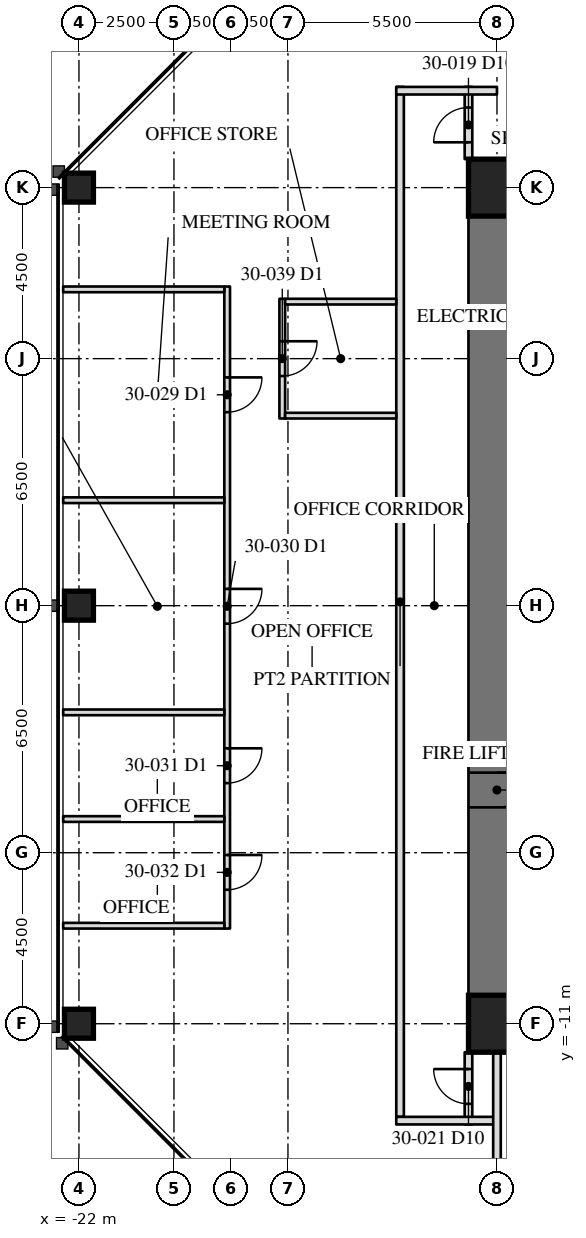
"""IFC4 building model, lengths in metres.
Left out: names, types, materials, properties, quantities, classifications, styles, units other than length and angle.
Written with IfcOpenShell. Run it as: python <this file> out.ifc"""

import sys

from ifc_helpers import new_model, si_unit, direction, frame, frame_2d, origin, origin_2d, place, context, subcontext, project, spatial, rectangle, hollow_rectangle, extrude, element, fill, save


model = new_model("IFC4")
c1 = context("Model", 3, precision=1e-05, world=origin(), true_north=direction((0.0, 1.0)))
c2 = subcontext(c1, "Body", "Model", "MODEL_VIEW")
j1 = project(units=[si_unit("LENGTHUNIT", "METRE"), si_unit("PLANEANGLEUNIT", "RADIAN")], contexts=[c1])
p1 = place(None, origin())
s1 = spatial("IfcSite", under=j1, at=p1, CompositionType="ELEMENT")
p2 = place(p1, origin())
s2 = spatial("IfcBuilding", under=s1, at=p2, CompositionType="ELEMENT")
p3 = place(p2, frame((0.0, 0.0, 129.5)))
s3 = spatial("IfcBuildingStorey", under=s2, at=p3, CompositionType="ELEMENT", Elevation=129.5)
for number, where, z_axis, x_axis in (
    (1, (-22.0, 0.0, 0.0), (0.0, 0.0, 1.0), (0.0, 1.0, 0.0)),
    (2, (-22.0, -11.0, 0.0), (0.0, 0.0, 1.0), (0.0, 1.0, 0.0)),
    (3, (-22.0, 11.0, 0.0), (0.0, 0.0, 1.0), (0.0, 1.0, 0.0)),
):
    element("IfcColumn", number, at=place(p3, frame(where, z_axis=z_axis, x_axis=x_axis)), inside=s3, PredefinedType="COLUMN", context=c2, shape_type="SweptSolid", body=[
        extrude(hollow_rectangle(XDim=0.762, YDim=0.762, WallThickness=0.076, at=origin_2d()), origin(), (0.0, 0.0, 1.0), 4.1),
    ])
p4 = place(p3, frame((-11.0, 11.0, 0.0), z_axis=(0.0, 0.0, 1.0), x_axis=(0.0, -1.0, 0.0)))
e4 = element("IfcWall", 4, at=p4, inside=s3, PredefinedType="SHEAR", context=c2, shape_type="SweptSolid", body=[
    extrude(rectangle(XDim=22.0, YDim=1.5, at=frame_2d((11.0, 0.0))), origin(), (0.0, 0.0, 1.0), 4.1),
])
p5 = place(p4, frame((15.393, 0.0, 0.0)))
e5 = element("IfcOpeningElement", 5, at=p5, cuts=e4, PredefinedType="OPENING", context=c2, shape_type="SweptSolid", body=[
    extrude(rectangle(XDim=0.915, YDim=2.134, at=frame_2d((0.458, 1.067))), frame((0.0, 0.76, 0.0), z_axis=(0.0, -1.0, 0.0), x_axis=(1.0, 0.0, 0.0)), (0.0, 0.0, 1.0), 1.52),
])
for number, where, z_axis, x_axis in (
    (6, (-6.5, 11.0, 0.0), (0.0, 0.0, 1.0), (-1.0, 0.0, 0.0)),
    (7, (-11.0, -11.0, 0.0), (0.0, 0.0, 1.0), (1.0, 0.0, 0.0)),
):
    element("IfcWall", number, at=place(p3, frame(where, z_axis=z_axis, x_axis=x_axis)), inside=s3, PredefinedType="SHEAR", context=c2, shape_type="SweptSolid", body=[
        extrude(rectangle(XDim=4.5, YDim=1.5, at=frame_2d((2.25, 0.0))), origin(), (0.0, 0.0, 1.0), 4.1),
    ])
for number, where, z_axis, x_axis in (
    (8, (-11.0, 11.0, 0.0), (0.0, 0.0, 1.0), (1.0, 0.0, 0.0)),
    (9, (-11.0, -11.0, 0.0), (0.0, 0.0, 1.0), (1.0, 0.0, 0.0)),
):
    element("IfcColumn", number, at=place(p3, frame(where, z_axis=z_axis, x_axis=x_axis)), inside=s3, PredefinedType="COLUMN", context=c2, shape_type="SweptSolid", body=[
        extrude(hollow_rectangle(XDim=1.499, YDim=1.499, WallThickness=0.102, at=origin_2d()), origin(), (0.0, 0.0, 1.0), 4.1),
    ])
p6 = place(p3, frame((-13.55, 13.65, 0.0), z_axis=(0.0, 0.0, 1.0), x_axis=(0.0, -1.0, 0.0)))
e10 = element("IfcWall", 10, at=p6, inside=s3, PredefinedType="PARTITIONING", context=c2, shape_type="SweptSolid", body=[
    extrude(rectangle(XDim=27.1, YDim=0.2, at=frame_2d((13.55, 0.0))), origin(), (0.0, 0.0, 1.0), 3.91),
])
p7 = place(p3, frame((-11.75, 11.75, 0.0), z_axis=(0.0, 0.0, 1.0), x_axis=(0.0, 1.0, 0.0)))
e11 = element("IfcWall", 11, at=p7, inside=s3, PredefinedType="PARTITIONING", context=c2, shape_type="SweptSolid", body=[
    extrude(rectangle(XDim=1.9, YDim=0.2, at=frame_2d((0.95, 0.0))), origin(), (0.0, 0.0, 1.0), 3.91),
])
p8 = place(p7, frame((0.442, 0.0, 0.0)))
e12 = element("IfcOpeningElement", 12, at=p8, cuts=e11, PredefinedType="OPENING", context=c2, shape_type="SweptSolid", body=[
    extrude(rectangle(XDim=0.915, YDim=2.134, at=frame_2d((0.458, 1.067))), frame((0.0, 0.11, 0.0), z_axis=(0.0, -1.0, 0.0), x_axis=(1.0, 0.0, 0.0)), (0.0, 0.0, 1.0), 0.22),
])
p9 = place(p3, frame((-11.0, 13.55, 0.0), z_axis=(0.0, 0.0, 1.0), x_axis=(-1.0, 0.0, 0.0)))
e13 = element("IfcWall", 13, at=p9, inside=s3, PredefinedType="PARTITIONING", context=c2, shape_type="SweptSolid", body=[
    extrude(rectangle(XDim=2.65, YDim=0.2, at=frame_2d((1.325, 0.0))), origin(), (0.0, 0.0, 1.0), 3.91),
])
p10 = place(p3, frame((-11.75, -11.75, 0.0), z_axis=(0.0, 0.0, 1.0), x_axis=(0.0, -1.0, 0.0)))
e14 = element("IfcWall", 14, at=p10, inside=s3, PredefinedType="PARTITIONING", context=c2, shape_type="SweptSolid", body=[
    extrude(rectangle(XDim=1.9, YDim=0.2, at=frame_2d((0.95, 0.0))), origin(), (0.0, 0.0, 1.0), 3.91),
])
p11 = place(p10, frame((0.442, 0.0, 0.0)))
e15 = element("IfcOpeningElement", 15, at=p11, cuts=e14, PredefinedType="OPENING", context=c2, shape_type="SweptSolid", body=[
    extrude(rectangle(XDim=0.915, YDim=2.134, at=frame_2d((0.458, 1.067))), frame((0.0, 0.11, 0.0), z_axis=(0.0, -1.0, 0.0), x_axis=(1.0, 0.0, 0.0)), (0.0, 0.0, 1.0), 0.22),
])
p12 = place(p3, frame((-11.0, -13.55, 0.0), z_axis=(0.0, 0.0, 1.0), x_axis=(-1.0, 0.0, 0.0)))
e16 = element("IfcWall", 16, at=p12, inside=s3, PredefinedType="PARTITIONING", context=c2, shape_type="SweptSolid", body=[
    extrude(rectangle(XDim=2.65, YDim=0.2, at=frame_2d((1.325, 0.0))), origin(), (0.0, 0.0, 1.0), 3.91),
])
p13 = place(p3, frame((-11.0, -11.75, 0.0), z_axis=(0.0, 0.0, 1.0), x_axis=(0.0, -1.0, 0.0)))
e17 = element("IfcWall", 17, at=p13, inside=s3, PredefinedType="PARTITIONING", context=c2, shape_type="SweptSolid", body=[
    extrude(rectangle(XDim=10.665, YDim=0.2, at=frame_2d((5.333, 0.0))), origin(), (0.0, 0.0, 1.0), 3.326),
])
p14 = place(p3, frame((-18.1, 8.398, 0.0), z_axis=(0.0, 0.0, 1.0), x_axis=(0.0, -1.0, 0.0)))
e18 = element("IfcWall", 18, at=p14, inside=s3, PredefinedType="PARTITIONING", context=c2, shape_type="SweptSolid", body=[
    extrude(rectangle(XDim=16.894, YDim=0.15, at=frame_2d((8.447, 0.0))), origin(), (0.0, 0.0, 1.0), 3.91),
])
p15 = place(p14, frame((2.392, 0.0, 0.0)))
e19 = element("IfcOpeningElement", 19, at=p15, cuts=e18, PredefinedType="OPENING", context=c2, shape_type="SweptSolid", body=[
    extrude(rectangle(XDim=0.915, YDim=2.134, at=frame_2d((0.458, 1.067))), frame((0.0, 0.085, 0.0), z_axis=(0.0, -1.0, 0.0), x_axis=(1.0, 0.0, 0.0)), (0.0, 0.0, 1.0), 0.17),
])
p16 = place(p14, frame((7.957, 0.0, 0.0)))
e20 = element("IfcOpeningElement", 20, at=p16, cuts=e18, PredefinedType="OPENING", context=c2, shape_type="SweptSolid", body=[
    extrude(rectangle(XDim=0.915, YDim=2.134, at=frame_2d((0.458, 1.067))), frame((0.0, 0.085, 0.0), z_axis=(0.0, -1.0, 0.0), x_axis=(1.0, 0.0, 0.0)), (0.0, 0.0, 1.0), 0.17),
])
p17 = place(p14, frame((12.151, 0.0, 0.0)))
e21 = element("IfcOpeningElement", 21, at=p17, cuts=e18, PredefinedType="OPENING", context=c2, shape_type="SweptSolid", body=[
    extrude(rectangle(XDim=0.915, YDim=2.134, at=frame_2d((0.458, 1.067))), frame((0.0, 0.085, 0.0), z_axis=(0.0, -1.0, 0.0), x_axis=(1.0, 0.0, 0.0)), (0.0, 0.0, 1.0), 0.17),
])
p18 = place(p14, frame((14.958, 0.0, 0.0)))
e22 = element("IfcOpeningElement", 22, at=p18, cuts=e18, PredefinedType="OPENING", context=c2, shape_type="SweptSolid", body=[
    extrude(rectangle(XDim=0.915, YDim=2.134, at=frame_2d((0.458, 1.067))), frame((0.0, 0.085, 0.0), z_axis=(0.0, -1.0, 0.0), x_axis=(1.0, 0.0, 0.0)), (0.0, 0.0, 1.0), 0.17),
])
for number, where, z_axis, x_axis in (
    (23, (-18.175, 8.323, 0.0), (0.0, 0.0, 1.0), (-1.0, 0.0, 0.0)),
    (24, (-18.175, 2.775, 0.0), (0.0, 0.0, 1.0), (-1.0, 0.0, 0.0)),
    (25, (-18.175, -2.807, 0.0), (0.0, 0.0, 1.0), (-1.0, 0.0, 0.0)),
    (26, (-18.175, -5.614, 0.0), (0.0, 0.0, 1.0), (-1.0, 0.0, 0.0)),
    (27, (-18.175, -8.421, 0.0), (0.0, 0.0, 1.0), (-1.0, 0.0, 0.0)),
):
    element("IfcWall", number, at=place(p3, frame(where, z_axis=z_axis, x_axis=x_axis)), inside=s3, PredefinedType="PARTITIONING", context=c2, shape_type="SweptSolid", body=[
        extrude(rectangle(XDim=4.24, YDim=0.15, at=frame_2d((2.12, 0.0))), origin(), (0.0, 0.0, 1.0), 3.91),
    ])
p19 = place(p3, frame((-16.65, 8.075, 0.0), z_axis=(0.0, 0.0, 1.0), x_axis=(0.0, -1.0, 0.0)))
e28 = element("IfcWall", 28, at=p19, inside=s3, PredefinedType="PARTITIONING", context=c2, shape_type="SweptSolid", body=[
    extrude(rectangle(XDim=3.15, YDim=0.15, at=frame_2d((1.575, 0.0))), origin(), (0.0, 0.0, 1.0), 3.91),
])
p20 = place(p19, frame((1.117, 0.0, 0.0)))
e29 = element("IfcOpeningElement", 29, at=p20, cuts=e28, PredefinedType="OPENING", context=c2, shape_type="SweptSolid", body=[
    extrude(rectangle(XDim=0.915, YDim=2.134, at=frame_2d((0.458, 1.067))), frame((0.0, 0.085, 0.0), z_axis=(0.0, -1.0, 0.0), x_axis=(1.0, 0.0, 0.0)), (0.0, 0.0, 1.0), 0.17),
])
for number, where, z_axis, x_axis in (
    (30, (-16.575, 8.0, 0.0), (0.0, 0.0, 1.0), (1.0, 0.0, 0.0)),
    (31, (-16.575, 5.0, 0.0), (0.0, 0.0, 1.0), (1.0, 0.0, 0.0)),
):
    element("IfcWall", number, at=place(p3, frame(where, z_axis=z_axis, x_axis=x_axis)), inside=s3, PredefinedType="PARTITIONING", context=c2, shape_type="SweptSolid", body=[
        extrude(rectangle(XDim=2.925, YDim=0.15, at=frame_2d((1.462, 0.0))), origin(), (0.0, 0.0, 1.0), 3.91),
    ])
p21 = place(p5, origin())
e32 = element("IfcDoor", 32, at=p21, inside=s3, OperationType="SINGLE_SWING_RIGHT", PredefinedType="DOOR", context=c2, shape_type="SweptSolid", body=[
    extrude(rectangle(XDim=0.915, YDim=2.134, at=frame_2d((0.458, 1.067))), frame((0.0, -0.675, 0.0), z_axis=(0.0, -1.0, 0.0), x_axis=(1.0, 0.0, 0.0)), (0.0, 0.0, 1.0), 0.05),
])
fill(e5, e32)
p22 = place(p8, origin())
e33 = element("IfcDoor", 33, at=p22, inside=s3, OperationType="SINGLE_SWING_LEFT", PredefinedType="DOOR", context=c2, shape_type="SweptSolid", body=[
    extrude(rectangle(XDim=0.915, YDim=2.134, at=frame_2d((0.458, 1.067))), frame((0.0, 0.025, 0.0), z_axis=(0.0, -1.0, 0.0), x_axis=(1.0, 0.0, 0.0)), (0.0, 0.0, 1.0), 0.05),
])
fill(e12, e33)
p23 = place(p11, frame((0.915, 0.0, 0.0), z_axis=(0.0, 0.0, 1.0), x_axis=(-1.0, 0.0, 0.0)))
e34 = element("IfcDoor", 34, at=p23, inside=s3, OperationType="SINGLE_SWING_LEFT", PredefinedType="DOOR", context=c2, shape_type="SweptSolid", body=[
    extrude(rectangle(XDim=0.915, YDim=2.134, at=frame_2d((0.458, 1.067))), frame((0.0, 0.025, 0.0), z_axis=(0.0, -1.0, 0.0), x_axis=(1.0, 0.0, 0.0)), (0.0, 0.0, 1.0), 0.05),
])
fill(e15, e34)
p24 = place(p15, origin())
e35 = element("IfcDoor", 35, at=p24, inside=s3, OperationType="SINGLE_SWING_LEFT", PredefinedType="DOOR", context=c2, shape_type="SweptSolid", body=[
    extrude(rectangle(XDim=0.915, YDim=2.134, at=frame_2d((0.458, 1.067))), frame((0.0, 0.025, 0.0), z_axis=(0.0, -1.0, 0.0), x_axis=(1.0, 0.0, 0.0)), (0.0, 0.0, 1.0), 0.05),
])
fill(e19, e35)
p25 = place(p16, origin())
e36 = element("IfcDoor", 36, at=p25, inside=s3, OperationType="SINGLE_SWING_LEFT", PredefinedType="DOOR", context=c2, shape_type="SweptSolid", body=[
    extrude(rectangle(XDim=0.915, YDim=2.134, at=frame_2d((0.458, 1.067))), frame((0.0, 0.025, 0.0), z_axis=(0.0, -1.0, 0.0), x_axis=(1.0, 0.0, 0.0)), (0.0, 0.0, 1.0), 0.05),
])
fill(e20, e36)
p26 = place(p17, origin())
e37 = element("IfcDoor", 37, at=p26, inside=s3, OperationType="SINGLE_SWING_LEFT", PredefinedType="DOOR", context=c2, shape_type="SweptSolid", body=[
    extrude(rectangle(XDim=0.915, YDim=2.134, at=frame_2d((0.458, 1.067))), frame((0.0, 0.025, 0.0), z_axis=(0.0, -1.0, 0.0), x_axis=(1.0, 0.0, 0.0)), (0.0, 0.0, 1.0), 0.05),
])
fill(e21, e37)
p27 = place(p18, origin())
e38 = element("IfcDoor", 38, at=p27, inside=s3, OperationType="SINGLE_SWING_LEFT", PredefinedType="DOOR", context=c2, shape_type="SweptSolid", body=[
    extrude(rectangle(XDim=0.915, YDim=2.134, at=frame_2d((0.458, 1.067))), frame((0.0, 0.025, 0.0), z_axis=(0.0, -1.0, 0.0), x_axis=(1.0, 0.0, 0.0)), (0.0, 0.0, 1.0), 0.05),
])
fill(e22, e38)
p28 = place(p20, origin())
e39 = element("IfcDoor", 39, at=p28, inside=s3, OperationType="SINGLE_SWING_LEFT", PredefinedType="DOOR", context=c2, shape_type="SweptSolid", body=[
    extrude(rectangle(XDim=0.915, YDim=2.134, at=frame_2d((0.458, 1.067))), frame((0.0, 0.025, 0.0), z_axis=(0.0, -1.0, 0.0), x_axis=(1.0, 0.0, 0.0)), (0.0, 0.0, 1.0), 0.05),
])
fill(e29, e39)
save(model, sys.argv[1])
